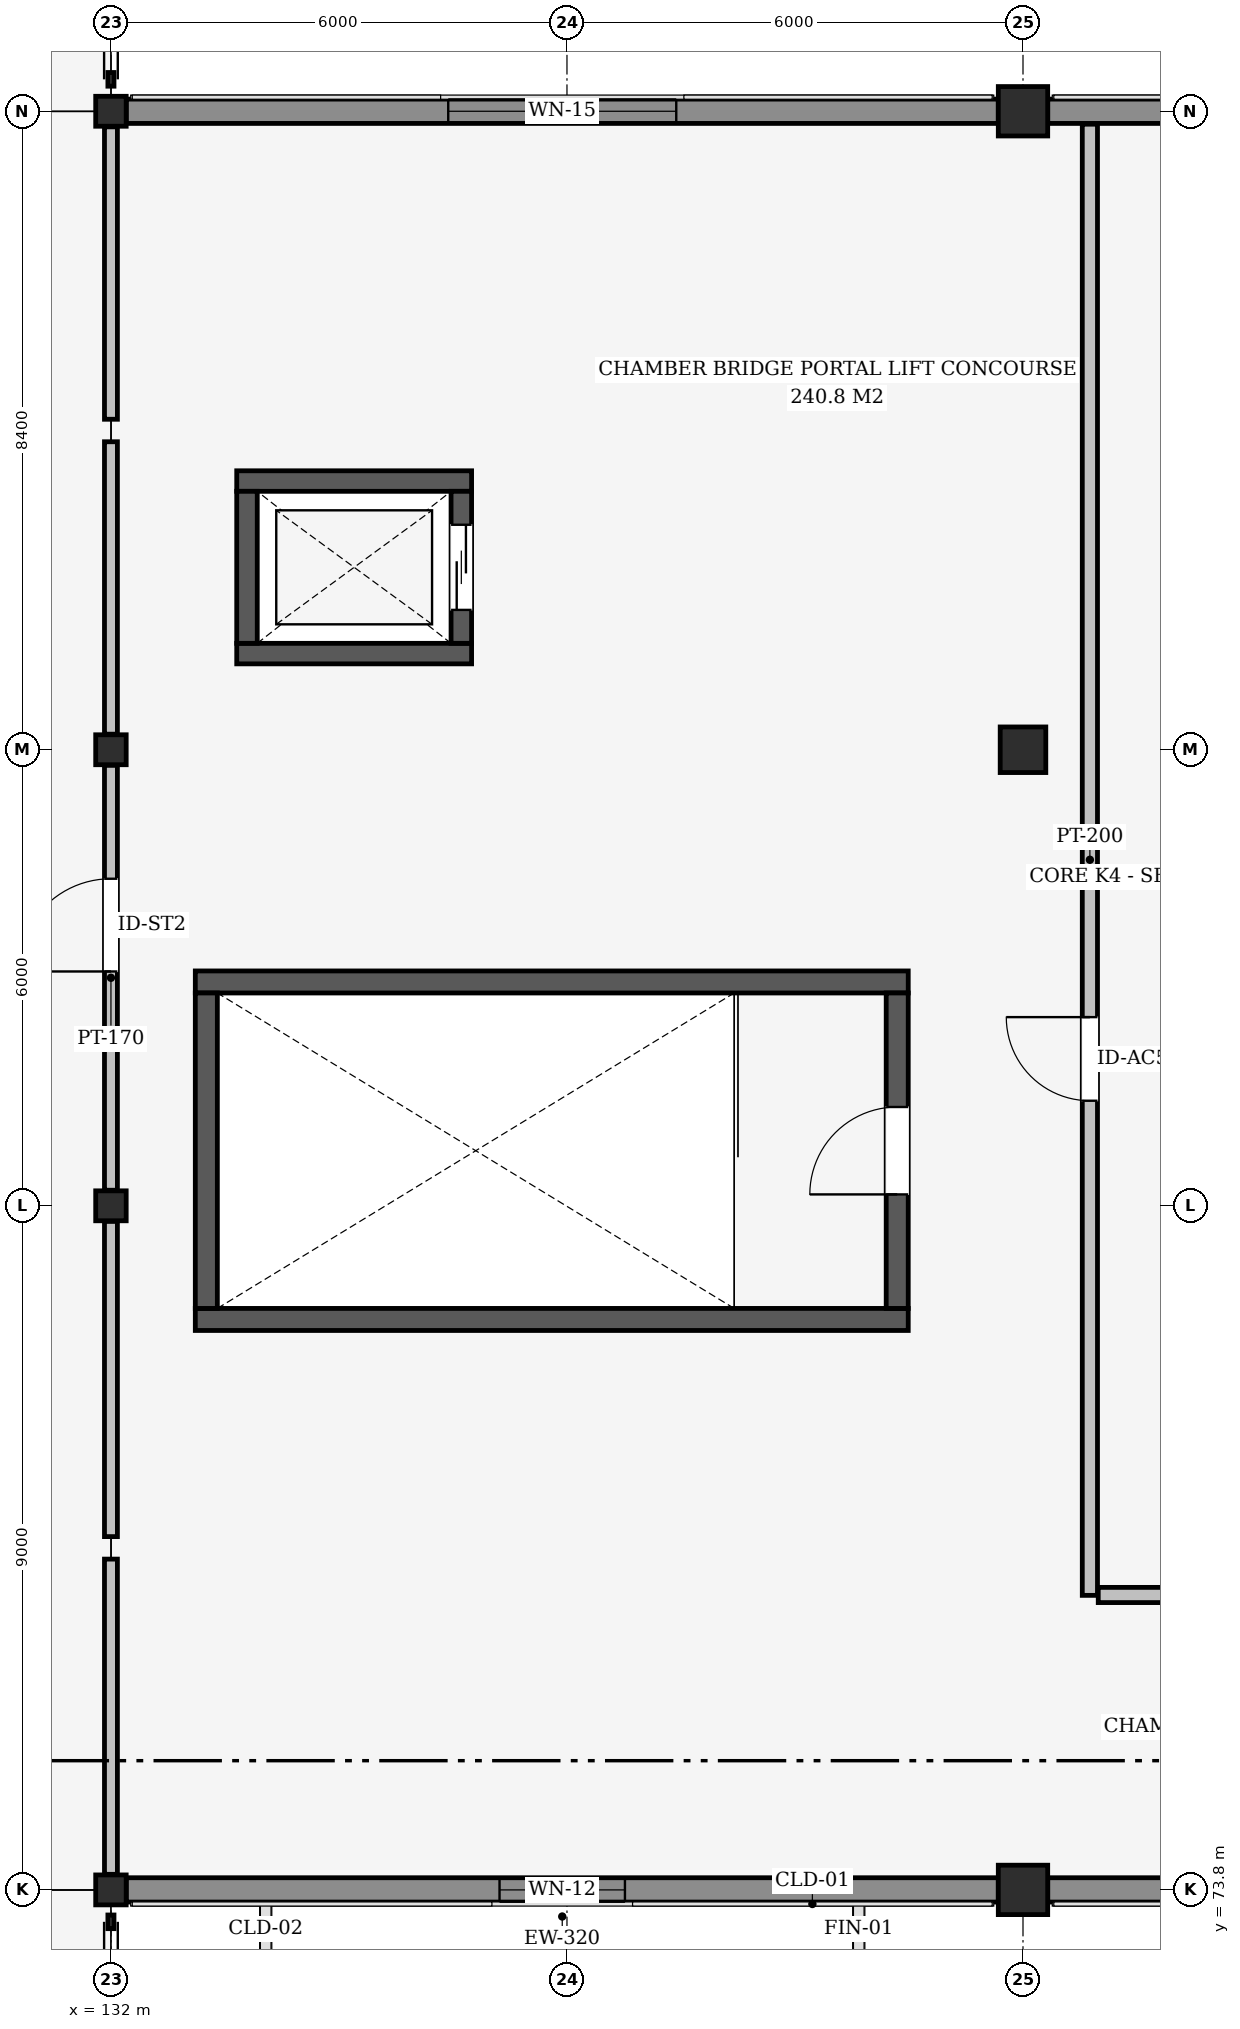
"""IFC4 building model, lengths in metres.
Left out: names, types, materials, properties, quantities, classifications, styles, units other than length and angle.
Written with IfcOpenShell. Run it as: python <this file> out.ifc"""

import sys

from ifc_helpers import new_model, si_unit, direction, frame, frame_2d, origin, origin_2d, place, context, subcontext, project, spatial, rectangle, i_section, extrude, element, fill, save


model = new_model("IFC4")
c1 = context("Model", 3, precision=1e-05, world=origin(), true_north=direction((0.0, 1.0)))
c2 = subcontext(c1, "Body", "Model", "MODEL_VIEW")
j1 = project(units=[si_unit("LENGTHUNIT", "METRE"), si_unit("PLANEANGLEUNIT", "RADIAN")], contexts=[c1])
p1 = place(None, origin())
s1 = spatial("IfcSite", under=j1, at=p1, CompositionType="ELEMENT")
p2 = place(p1, origin())
s2 = spatial("IfcBuilding", under=s1, at=p2, CompositionType="ELEMENT")
p3 = place(p2, frame((0.0, 0.0, 13.8)))
s3 = spatial("IfcBuildingStorey", under=s2, at=p3, CompositionType="ELEMENT", Elevation=13.8)
for number, where, z_axis, x_axis in (
    (1, (132.0, 73.8, 0.0), (0.0, 0.0, 1.0), (1.0, 0.0, 0.0)),
    (2, (132.0, 82.8, 0.0), (0.0, 0.0, 1.0), (1.0, 0.0, 0.0)),
    (3, (132.0, 88.8, 0.0), (0.0, 0.0, 1.0), (1.0, 0.0, 0.0)),
    (4, (132.0, 97.2, 0.0), (0.0, 0.0, 1.0), (1.0, 0.0, 0.0)),
):
    element("IfcColumn", number, at=place(p3, frame(where, z_axis=z_axis, x_axis=x_axis)), inside=s3, PredefinedType="COLUMN", context=c2, shape_type="SweptSolid", body=[
        extrude(i_section(OverallWidth=0.401, OverallDepth=0.394, WebThickness=0.023, FlangeThickness=0.037, at=origin_2d()), origin(), (0.0, 0.0, 1.0), 4.5),
    ])
p4 = place(p3, frame((144.0, 73.8, 0.0), z_axis=(0.0, 0.0, 1.0), x_axis=(1.0, 0.0, 0.0)))
e5 = element("IfcColumn", 5, at=p4, inside=s3, PredefinedType="COLUMN", context=c2, shape_type="SweptSolid", body=[
    extrude(rectangle(XDim=0.65, YDim=0.65, at=origin_2d()), origin(), (0.0, 0.0, 1.0), 4.5),
])
p5 = place(p3, frame((144.0, 88.8, 0.0), z_axis=(0.0, 0.0, 1.0), x_axis=(1.0, 0.0, 0.0)))
e6 = element("IfcColumn", 6, at=p5, inside=s3, PredefinedType="COLUMN", context=c2, shape_type="SweptSolid", body=[
    extrude(rectangle(XDim=0.6, YDim=0.6, at=origin_2d()), origin(), (0.0, 0.0, 1.0), 4.5),
])
p6 = place(p3, frame((144.0, 97.2, 0.0), z_axis=(0.0, 0.0, 1.0), x_axis=(1.0, 0.0, 0.0)))
e7 = element("IfcColumn", 7, at=p6, inside=s3, PredefinedType="COLUMN", context=c2, shape_type="SweptSolid", body=[
    extrude(rectangle(XDim=0.65, YDim=0.65, at=origin_2d()), origin(), (0.0, 0.0, 1.0), 4.5),
])
p7 = place(p3, frame((143.675, 73.8, 0.0), z_axis=(0.0, 0.0, 1.0), x_axis=(-1.0, 0.0, 0.0)))
e8 = element("IfcWall", 8, at=p7, inside=s3, PredefinedType="SOLIDWALL", context=c2, shape_type="SweptSolid", body=[
    extrude(rectangle(XDim=11.475, YDim=0.32, at=frame_2d((5.737, 0.0))), origin(), (0.0, 0.0, 1.0), 3.944),
])
p8 = place(p7, frame((4.912, 0.0, 0.85)))
e9 = element("IfcOpeningElement", 9, at=p8, cuts=e8, PredefinedType="OPENING", context=c2, shape_type="SweptSolid", body=[
    extrude(rectangle(XDim=1.65, YDim=1.75, at=frame_2d((0.825, 0.875))), frame((0.0, 0.17, 0.0), z_axis=(0.0, -1.0, 0.0), x_axis=(1.0, 0.0, 0.0)), (0.0, 0.0, 1.0), 0.34),
])
p9 = place(p3, frame((155.675, 73.8, 0.0), z_axis=(0.0, 0.0, 1.0), x_axis=(-1.0, 0.0, 0.0)))
e10 = element("IfcWall", 10, at=p9, inside=s3, PredefinedType="SOLIDWALL", context=c2, shape_type="SweptSolid", body=[
    extrude(rectangle(XDim=11.35, YDim=0.32, at=frame_2d((5.675, 0.0))), origin(), (0.0, 0.0, 1.0), 3.944),
])
p10 = place(p9, frame((5.25, 0.0, 0.6)))
e11 = element("IfcOpeningElement", 11, at=p10, cuts=e10, PredefinedType="OPENING", context=c2, shape_type="SweptSolid", body=[
    extrude(rectangle(XDim=0.85, YDim=2.35, at=frame_2d((0.425, 1.175))), frame((0.0, 0.17, 0.0), z_axis=(0.0, -1.0, 0.0), x_axis=(1.0, 0.0, 0.0)), (0.0, 0.0, 1.0), 0.34),
])
p11 = place(p3, frame((132.2, 97.2, 0.0), z_axis=(0.0, 0.0, 1.0), x_axis=(1.0, 0.0, 0.0)))
e12 = element("IfcWall", 12, at=p11, inside=s3, PredefinedType="SOLIDWALL", context=c2, shape_type="SweptSolid", body=[
    extrude(rectangle(XDim=11.475, YDim=0.32, at=frame_2d((5.737, 0.0))), origin(), (0.0, 0.0, 1.0), 3.944),
])
p12 = place(p11, frame((4.237, 0.0, 0.6)))
e13 = element("IfcOpeningElement", 13, at=p12, cuts=e12, PredefinedType="OPENING", context=c2, shape_type="SweptSolid", body=[
    extrude(rectangle(XDim=3.0, YDim=2.1, at=frame_2d((1.5, 1.05))), frame((0.0, 0.17, 0.0), z_axis=(0.0, -1.0, 0.0), x_axis=(1.0, 0.0, 0.0)), (0.0, 0.0, 1.0), 0.34),
])
p13 = place(p3, frame((144.325, 97.2, 0.0), z_axis=(0.0, 0.0, 1.0), x_axis=(1.0, 0.0, 0.0)))
e14 = element("IfcWall", 14, at=p13, inside=s3, PredefinedType="SOLIDWALL", context=c2, shape_type="SweptSolid", body=[
    extrude(rectangle(XDim=11.35, YDim=0.32, at=frame_2d((5.675, 0.0))), origin(), (0.0, 0.0, 1.0), 3.944),
])
p14 = place(p13, frame((4.675, 0.0, 0.85)))
e15 = element("IfcOpeningElement", 15, at=p14, cuts=e14, PredefinedType="OPENING", context=c2, shape_type="SweptSolid", body=[
    extrude(rectangle(XDim=2.0, YDim=1.85, at=frame_2d((1.0, 0.925))), frame((0.0, 0.17, 0.0), z_axis=(0.0, -1.0, 0.0), x_axis=(1.0, 0.0, 0.0)), (0.0, 0.0, 1.0), 0.34),
])
for number, where, z_axis, x_axis in (
    (16, (133.11, 81.305, 0.0), (0.0, 0.0, 1.0), (1.0, 0.0, 0.0)),
    (17, (133.11, 85.745, 0.0), (0.0, 0.0, 1.0), (1.0, 0.0, 0.0)),
):
    element("IfcWall", number, at=place(p3, frame(where, z_axis=z_axis, x_axis=x_axis)), inside=s3, PredefinedType="SHEAR", context=c2, shape_type="SweptSolid", body=[
        extrude(rectangle(XDim=9.38, YDim=0.29, at=frame_2d((4.69, 0.0))), origin(), (0.0, 0.0, 1.0), 4.5),
    ])
p15 = place(p3, frame((133.255, 81.45, 0.0), z_axis=(0.0, 0.0, 1.0), x_axis=(0.0, 1.0, 0.0)))
e18 = element("IfcWall", 18, at=p15, inside=s3, PredefinedType="SHEAR", context=c2, shape_type="SweptSolid", body=[
    extrude(rectangle(XDim=4.15, YDim=0.29, at=frame_2d((2.075, 0.0))), origin(), (0.0, 0.0, 1.0), 4.5),
])
p16 = place(p3, frame((142.345, 81.45, 0.0), z_axis=(0.0, 0.0, 1.0), x_axis=(0.0, 1.0, 0.0)))
e19 = element("IfcWall", 19, at=p16, inside=s3, PredefinedType="SHEAR", context=c2, shape_type="SweptSolid", body=[
    extrude(rectangle(XDim=4.15, YDim=0.29, at=frame_2d((2.075, 0.0))), origin(), (0.0, 0.0, 1.0), 4.5),
])
p17 = place(p16, frame((1.5, 0.0, 0.0)))
e20 = element("IfcOpeningElement", 20, at=p17, cuts=e19, PredefinedType="OPENING", context=c2, shape_type="SweptSolid", body=[
    extrude(rectangle(XDim=1.15, YDim=2.15, at=frame_2d((0.575, 1.075))), frame((0.0, 0.155, 0.0), z_axis=(0.0, -1.0, 0.0), x_axis=(1.0, 0.0, 0.0)), (0.0, 0.0, 1.0), 0.31),
])
for number, where, z_axis, x_axis in (
    (21, (133.655, 90.065, 0.0), (0.0, 0.0, 1.0), (1.0, 0.0, 0.0)),
    (22, (133.655, 92.335, 0.0), (0.0, 0.0, 1.0), (1.0, 0.0, 0.0)),
):
    element("IfcWall", number, at=place(p3, frame(where, z_axis=z_axis, x_axis=x_axis)), inside=s3, PredefinedType="SHEAR", context=c2, shape_type="SweptSolid", body=[
        extrude(rectangle(XDim=3.09, YDim=0.27, at=frame_2d((1.545, 0.0))), origin(), (0.0, 0.0, 1.0), 4.5),
    ])
p18 = place(p3, frame((133.79, 90.2, 0.0), z_axis=(0.0, 0.0, 1.0), x_axis=(0.0, 1.0, 0.0)))
e23 = element("IfcWall", 23, at=p18, inside=s3, PredefinedType="SHEAR", context=c2, shape_type="SweptSolid", body=[
    extrude(rectangle(XDim=2.0, YDim=0.27, at=frame_2d((1.0, 0.0))), origin(), (0.0, 0.0, 1.0), 4.5),
])
p19 = place(p3, frame((136.61, 90.2, 0.0), z_axis=(0.0, 0.0, 1.0), x_axis=(0.0, 1.0, 0.0)))
e24 = element("IfcWall", 24, at=p19, inside=s3, PredefinedType="SHEAR", context=c2, shape_type="SweptSolid", body=[
    extrude(rectangle(XDim=2.0, YDim=0.27, at=frame_2d((1.0, 0.0))), origin(), (0.0, 0.0, 1.0), 4.5),
])
p20 = place(p19, frame((0.44, 0.0, 0.0)))
e25 = element("IfcOpeningElement", 25, at=p20, cuts=e24, PredefinedType="OPENING", context=c2, shape_type="SweptSolid", body=[
    extrude(rectangle(XDim=1.12, YDim=2.15, at=frame_2d((0.56, 1.075))), frame((0.0, 0.145, 0.0), z_axis=(0.0, -1.0, 0.0), x_axis=(1.0, 0.0, 0.0)), (0.0, 0.0, 1.0), 0.29),
])
p21 = place(p3, frame((132.0, 74.005, 0.0), z_axis=(0.0, 0.0, 1.0), x_axis=(0.0, 1.0, 0.0)))
e26 = element("IfcWall", 26, at=p21, inside=s3, PredefinedType="PARTITIONING", context=c2, shape_type="SweptSolid", body=[
    extrude(rectangle(XDim=4.147, YDim=0.17, at=frame_2d((2.074, 0.0))), origin(), (0.0, 0.0, 1.0), 3.801),
])
p22 = place(p3, frame((132.0, 78.448, 0.0), z_axis=(0.0, 0.0, 1.0), x_axis=(0.0, 1.0, 0.0)))
e27 = element("IfcWall", 27, at=p22, inside=s3, PredefinedType="PARTITIONING", context=c2, shape_type="SweptSolid", body=[
    extrude(rectangle(XDim=4.147, YDim=0.17, at=frame_2d((2.073, 0.0))), origin(), (0.0, 0.0, 1.0), 3.801),
])
p23 = place(p3, frame((132.0, 83.005, 0.0), z_axis=(0.0, 0.0, 1.0), x_axis=(0.0, 1.0, 0.0)))
e28 = element("IfcWall", 28, at=p23, inside=s3, PredefinedType="PARTITIONING", context=c2, shape_type="SweptSolid", body=[
    extrude(rectangle(XDim=5.59, YDim=0.17, at=frame_2d((2.795, 0.0))), origin(), (0.0, 0.0, 1.0), 3.801),
])
p24 = place(p23, frame((2.878, 0.0, 0.0)))
e29 = element("IfcOpeningElement", 29, at=p24, cuts=e28, PredefinedType="OPENING", context=c2, shape_type="SweptSolid", body=[
    extrude(rectangle(XDim=1.22, YDim=2.18, at=frame_2d((0.61, 1.09))), frame((0.0, 0.095, 0.0), z_axis=(0.0, -1.0, 0.0), x_axis=(1.0, 0.0, 0.0)), (0.0, 0.0, 1.0), 0.19),
])
for number, where, z_axis, x_axis in (
    (30, (132.0, 89.005, 0.0), (0.0, 0.0, 1.0), (0.0, 1.0, 0.0)),
    (31, (132.0, 93.148, 0.0), (0.0, 0.0, 1.0), (0.0, 1.0, 0.0)),
):
    element("IfcWall", number, at=place(p3, frame(where, z_axis=z_axis, x_axis=x_axis)), inside=s3, PredefinedType="PARTITIONING", context=c2, shape_type="SweptSolid", body=[
        extrude(rectangle(XDim=3.847, YDim=0.17, at=frame_2d((1.924, 0.0))), origin(), (0.0, 0.0, 1.0), 3.801),
    ])
p25 = place(p3, frame((144.88, 77.675, 0.0), z_axis=(0.0, 0.0, 1.0), x_axis=(0.0, 1.0, 0.0)))
e32 = element("IfcWall", 32, at=p25, inside=s3, PredefinedType="PARTITIONING", context=c2, shape_type="SweptSolid", body=[
    extrude(rectangle(XDim=19.355, YDim=0.2, at=frame_2d((9.677, 0.0))), origin(), (0.0, 0.0, 1.0), 4.5),
])
p26 = place(p25, frame((6.507, 0.0, 0.0)))
e33 = element("IfcOpeningElement", 33, at=p26, cuts=e32, PredefinedType="OPENING", context=c2, shape_type="SweptSolid", body=[
    extrude(rectangle(XDim=1.1, YDim=2.26, at=frame_2d((0.55, 1.13))), frame((0.0, 0.11, 0.0), z_axis=(0.0, -1.0, 0.0), x_axis=(1.0, 0.0, 0.0)), (0.0, 0.0, 1.0), 0.22),
])
p27 = place(p3, frame((144.99, 77.68, 0.0), z_axis=(0.0, 0.0, 1.0), x_axis=(1.0, 0.0, 0.0)))
e34 = element("IfcWall", 34, at=p27, inside=s3, PredefinedType="PARTITIONING", context=c2, shape_type="SweptSolid", body=[
    extrude(rectangle(XDim=13.895, YDim=0.2, at=frame_2d((6.948, 0.0))), origin(), (0.0, 0.0, 1.0), 4.5),
])
p28 = place(p27, frame((6.397, 0.0, 0.0)))
e35 = element("IfcOpeningElement", 35, at=p28, cuts=e34, PredefinedType="OPENING", context=c2, shape_type="SweptSolid", body=[
    extrude(rectangle(XDim=1.1, YDim=2.26, at=frame_2d((0.55, 1.13))), frame((0.0, 0.11, 0.0), z_axis=(0.0, -1.0, 0.0), x_axis=(1.0, 0.0, 0.0)), (0.0, 0.0, 1.0), 0.22),
])
p29 = place(p8, origin())
e36 = element("IfcWindow", 36, at=p29, inside=s3, PartitioningType="SINGLE_PANEL", PredefinedType="WINDOW", context=c2, shape_type="SweptSolid", body=[
    extrude(rectangle(XDim=1.65, YDim=1.75, at=frame_2d((0.825, 0.875))), frame((0.0, 0.03, 0.0), z_axis=(0.0, -1.0, 0.0), x_axis=(1.0, 0.0, 0.0)), (0.0, 0.0, 1.0), 0.06),
])
fill(e9, e36)
p30 = place(p12, origin())
e37 = element("IfcWindow", 37, at=p30, inside=s3, PartitioningType="SINGLE_PANEL", PredefinedType="WINDOW", context=c2, shape_type="SweptSolid", body=[
    extrude(rectangle(XDim=3.0, YDim=2.1, at=frame_2d((1.5, 1.05))), frame((0.0, 0.03, 0.0), z_axis=(0.0, -1.0, 0.0), x_axis=(1.0, 0.0, 0.0)), (0.0, 0.0, 1.0), 0.06),
])
fill(e13, e37)
p31 = place(p17, origin())
e38 = element("IfcDoor", 38, at=p31, inside=s3, OperationType="SINGLE_SWING_LEFT", PredefinedType="DOOR", context=c2, shape_type="SweptSolid", body=[
    extrude(rectangle(XDim=1.15, YDim=2.15, at=frame_2d((0.575, 1.075))), frame((0.0, 0.025, 0.0), z_axis=(0.0, -1.0, 0.0), x_axis=(1.0, 0.0, 0.0)), (0.0, 0.0, 1.0), 0.05),
])
fill(e20, e38)
p32 = place(p20, origin())
e39 = element("IfcDoor", 39, at=p32, inside=s3, OperationType="SLIDING_TO_LEFT", PredefinedType="DOOR", context=c2, shape_type="SweptSolid", body=[
    extrude(rectangle(XDim=1.12, YDim=2.15, at=frame_2d((0.56, 1.075))), frame((0.0, 0.025, 0.0), z_axis=(0.0, -1.0, 0.0), x_axis=(1.0, 0.0, 0.0)), (0.0, 0.0, 1.0), 0.05),
])
fill(e25, e39)
p33 = place(p24, origin())
e40 = element("IfcDoor", 40, at=p33, inside=s3, OperationType="SINGLE_SWING_LEFT", PredefinedType="DOOR", context=c2, shape_type="SweptSolid", body=[
    extrude(rectangle(XDim=1.22, YDim=2.18, at=frame_2d((0.61, 1.09))), frame((0.0, 0.025, 0.0), z_axis=(0.0, -1.0, 0.0), x_axis=(1.0, 0.0, 0.0)), (0.0, 0.0, 1.0), 0.05),
])
fill(e29, e40)
p34 = place(p26, origin())
e41 = element("IfcDoor", 41, at=p34, inside=s3, OperationType="SINGLE_SWING_RIGHT", PredefinedType="DOOR", context=c2, shape_type="SweptSolid", body=[
    extrude(rectangle(XDim=1.1, YDim=2.26, at=frame_2d((0.55, 1.13))), frame((0.0, 0.025, 0.0), z_axis=(0.0, -1.0, 0.0), x_axis=(1.0, 0.0, 0.0)), (0.0, 0.0, 1.0), 0.05),
])
fill(e33, e41)
save(model, sys.argv[1])
